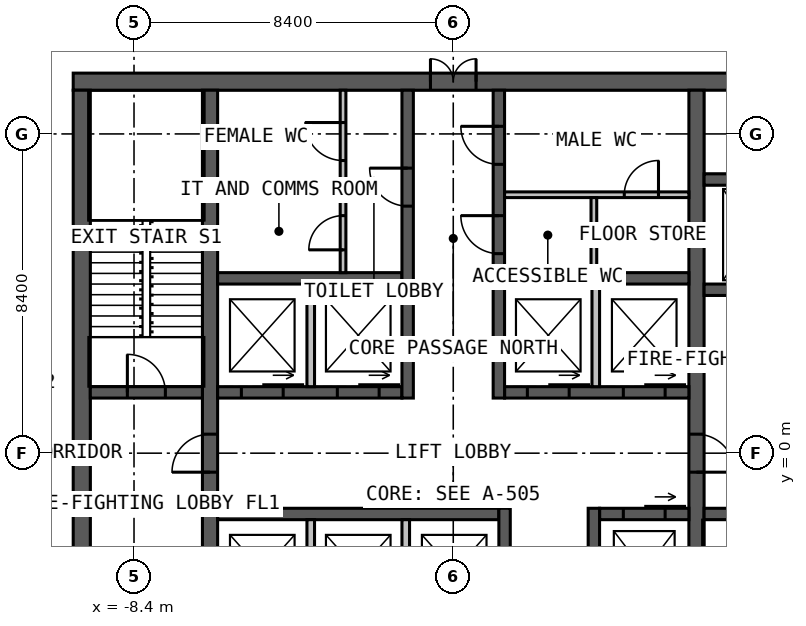
"""IFC4 building model, lengths in metres.
Left out: names, types, materials, properties, quantities, classifications, styles, units other than length and angle.
Written with IfcOpenShell. Run it as: python <this file> out.ifc"""

import sys

from ifc_helpers import new_model, si_unit, direction, frame, frame_2d, origin, place, context, subcontext, project, spatial, rectangle, extrude, element, fill, save


model = new_model("IFC4")
c1 = context("Model", 3, precision=1e-05, world=origin(), true_north=direction((0.0, 1.0)))
c2 = subcontext(c1, "Body", "Model", "MODEL_VIEW")
j1 = project(units=[si_unit("LENGTHUNIT", "METRE"), si_unit("PLANEANGLEUNIT", "RADIAN")], contexts=[c1])
p1 = place(None, origin())
s1 = spatial("IfcSite", under=j1, at=p1, CompositionType="ELEMENT")
p2 = place(p1, origin())
s2 = spatial("IfcBuilding", under=s1, at=p2, CompositionType="ELEMENT")
p3 = place(p2, frame((0.0, 0.0, 187.0)))
s3 = spatial("IfcBuildingStorey", under=s2, at=p3, CompositionType="ELEMENT", Elevation=187.0)
p4 = place(p3, frame((-10.0, 9.775, 0.0), z_axis=(0.0, 0.0, 1.0), x_axis=(1.0, 0.0, 0.0)))
e1 = element("IfcWall", 1, at=p4, inside=s3, PredefinedType="SOLIDWALL", context=c2, shape_type="SweptSolid", body=[
    extrude(rectangle(XDim=20.0, YDim=0.45, at=frame_2d((10.0, 0.0))), origin(), (0.0, 0.0, 1.0), 4.0),
])
p5 = place(p4, frame((9.4, 0.0, 0.0)))
e2 = element("IfcOpeningElement", 2, at=p5, cuts=e1, PredefinedType="OPENING", context=c2, shape_type="SweptSolid", body=[
    extrude(rectangle(XDim=1.2, YDim=2.2, at=frame_2d((0.6, 1.1))), frame((0.0, 0.235, 0.0), z_axis=(0.0, -1.0, 0.0), x_axis=(1.0, 0.0, 0.0)), (0.0, 0.0, 1.0), 0.47),
])
p6 = place(p3, frame((-9.775, 9.55, 0.0), z_axis=(0.0, 0.0, 1.0), x_axis=(0.0, -1.0, 0.0)))
e3 = element("IfcWall", 3, at=p6, inside=s3, PredefinedType="SOLIDWALL", context=c2, shape_type="SweptSolid", body=[
    extrude(rectangle(XDim=19.1, YDim=0.45, at=frame_2d((9.55, 0.0))), origin(), (0.0, 0.0, 1.0), 4.0),
])
p7 = place(p3, frame((-6.4, -9.55, 0.0), z_axis=(0.0, 0.0, 1.0), x_axis=(0.0, 1.0, 0.0)))
e4 = element("IfcWall", 4, at=p7, inside=s3, PredefinedType="SOLIDWALL", context=c2, shape_type="SweptSolid", body=[
    extrude(rectangle(XDim=19.1, YDim=0.4, at=frame_2d((9.55, 0.0))), origin(), (0.0, 0.0, 1.0), 4.0),
])
p8 = place(p7, frame((9.05, 0.0, 0.0)))
e5 = element("IfcOpeningElement", 5, at=p8, cuts=e4, PredefinedType="OPENING", context=c2, shape_type="SweptSolid", body=[
    extrude(rectangle(XDim=1.0, YDim=2.2, at=frame_2d((0.5, 1.1))), frame((0.0, 0.21, 0.0), z_axis=(0.0, -1.0, 0.0), x_axis=(1.0, 0.0, 0.0)), (0.0, 0.0, 1.0), 0.42),
])
p9 = place(p3, frame((6.4, 9.55, 0.0), z_axis=(0.0, 0.0, 1.0), x_axis=(0.0, -1.0, 0.0)))
e6 = element("IfcWall", 6, at=p9, inside=s3, PredefinedType="SOLIDWALL", context=c2, shape_type="SweptSolid", body=[
    extrude(rectangle(XDim=19.1, YDim=0.4, at=frame_2d((9.55, 0.0))), origin(), (0.0, 0.0, 1.0), 4.0),
])
p10 = place(p9, frame((9.05, 0.0, 0.0)))
e7 = element("IfcOpeningElement", 7, at=p10, cuts=e6, PredefinedType="OPENING", context=c2, shape_type="SweptSolid", body=[
    extrude(rectangle(XDim=1.0, YDim=2.2, at=frame_2d((0.5, 1.1))), frame((0.0, 0.21, 0.0), z_axis=(0.0, -1.0, 0.0), x_axis=(1.0, 0.0, 0.0)), (0.0, 0.0, 1.0), 0.42),
])
p11 = place(p3, frame((-6.2, 1.6, 0.0), z_axis=(0.0, 0.0, 1.0), x_axis=(1.0, 0.0, 0.0)))
e8 = element("IfcWall", 8, at=p11, inside=s3, PredefinedType="SOLIDWALL", context=c2, shape_type="SweptSolid", body=[
    extrude(rectangle(XDim=4.85, YDim=0.3, at=frame_2d((2.425, 0.0))), origin(), (0.0, 0.0, 1.0), 4.0),
])
p12 = place(p11, frame((0.625, 0.0, 0.0)))
e9 = element("IfcOpeningElement", 9, at=p12, cuts=e8, PredefinedType="OPENING", context=c2, shape_type="SweptSolid", body=[
    extrude(rectangle(XDim=1.1, YDim=2.2, at=frame_2d((0.55, 1.1))), frame((0.0, 0.16, 0.0), z_axis=(0.0, -1.0, 0.0), x_axis=(1.0, 0.0, 0.0)), (0.0, 0.0, 1.0), 0.32),
])
p13 = place(p11, frame((3.15, 0.0, 0.0)))
e10 = element("IfcOpeningElement", 10, at=p13, cuts=e8, PredefinedType="OPENING", context=c2, shape_type="SweptSolid", body=[
    extrude(rectangle(XDim=1.1, YDim=2.2, at=frame_2d((0.55, 1.1))), frame((0.0, 0.16, 0.0), z_axis=(0.0, -1.0, 0.0), x_axis=(1.0, 0.0, 0.0)), (0.0, 0.0, 1.0), 0.32),
])
p14 = place(p3, frame((1.35, 1.6, 0.0), z_axis=(0.0, 0.0, 1.0), x_axis=(1.0, 0.0, 0.0)))
e11 = element("IfcWall", 11, at=p14, inside=s3, PredefinedType="SOLIDWALL", context=c2, shape_type="SweptSolid", body=[
    extrude(rectangle(XDim=4.85, YDim=0.3, at=frame_2d((2.425, 0.0))), origin(), (0.0, 0.0, 1.0), 4.0),
])
p15 = place(p14, frame((0.6, 0.0, 0.0)))
e12 = element("IfcOpeningElement", 12, at=p15, cuts=e11, PredefinedType="OPENING", context=c2, shape_type="SweptSolid", body=[
    extrude(rectangle(XDim=1.1, YDim=2.2, at=frame_2d((0.55, 1.1))), frame((0.0, 0.16, 0.0), z_axis=(0.0, -1.0, 0.0), x_axis=(1.0, 0.0, 0.0)), (0.0, 0.0, 1.0), 0.32),
])
p16 = place(p14, frame((3.125, 0.0, 0.0)))
e13 = element("IfcOpeningElement", 13, at=p16, cuts=e11, PredefinedType="OPENING", context=c2, shape_type="SweptSolid", body=[
    extrude(rectangle(XDim=1.1, YDim=2.2, at=frame_2d((0.55, 1.1))), frame((0.0, 0.16, 0.0), z_axis=(0.0, -1.0, 0.0), x_axis=(1.0, 0.0, 0.0)), (0.0, 0.0, 1.0), 0.32),
])
for number, where, z_axis, x_axis in (
    (14, (-6.2, 4.6, 0.0), (0.0, 0.0, 1.0), (1.0, 0.0, 0.0)),
    (15, (1.35, 4.6, 0.0), (0.0, 0.0, 1.0), (1.0, 0.0, 0.0)),
):
    element("IfcWall", number, at=place(p3, frame(where, z_axis=z_axis, x_axis=x_axis)), inside=s3, PredefinedType="SOLIDWALL", context=c2, shape_type="SweptSolid", body=[
        extrude(rectangle(XDim=4.85, YDim=0.3, at=frame_2d((2.425, 0.0))), origin(), (0.0, 0.0, 1.0), 4.0),
    ])
p17 = place(p3, frame((-1.2, 1.45, 0.0), z_axis=(0.0, 0.0, 1.0), x_axis=(0.0, 1.0, 0.0)))
e16 = element("IfcWall", 16, at=p17, inside=s3, PredefinedType="SOLIDWALL", context=c2, shape_type="SweptSolid", body=[
    extrude(rectangle(XDim=8.1, YDim=0.3, at=frame_2d((4.05, 0.0))), origin(), (0.0, 0.0, 1.0), 4.0),
])
p18 = place(p17, frame((5.05, 0.0, 0.0)))
e17 = element("IfcOpeningElement", 17, at=p18, cuts=e16, PredefinedType="OPENING", context=c2, shape_type="SweptSolid", body=[
    extrude(rectangle(XDim=1.0, YDim=2.2, at=frame_2d((0.5, 1.1))), frame((0.0, 0.16, 0.0), z_axis=(0.0, -1.0, 0.0), x_axis=(1.0, 0.0, 0.0)), (0.0, 0.0, 1.0), 0.32),
])
p19 = place(p3, frame((1.2, 1.45, 0.0), z_axis=(0.0, 0.0, 1.0), x_axis=(0.0, 1.0, 0.0)))
e18 = element("IfcWall", 18, at=p19, inside=s3, PredefinedType="SOLIDWALL", context=c2, shape_type="SweptSolid", body=[
    extrude(rectangle(XDim=8.1, YDim=0.3, at=frame_2d((4.05, 0.0))), origin(), (0.0, 0.0, 1.0), 4.0),
])
p20 = place(p19, frame((3.8, 0.0, 0.0)))
e19 = element("IfcOpeningElement", 19, at=p20, cuts=e18, PredefinedType="OPENING", context=c2, shape_type="SweptSolid", body=[
    extrude(rectangle(XDim=1.0, YDim=2.2, at=frame_2d((0.5, 1.1))), frame((0.0, 0.16, 0.0), z_axis=(0.0, -1.0, 0.0), x_axis=(1.0, 0.0, 0.0)), (0.0, 0.0, 1.0), 0.32),
])
p21 = place(p19, frame((6.15, 0.0, 0.0)))
e20 = element("IfcOpeningElement", 20, at=p21, cuts=e18, PredefinedType="OPENING", context=c2, shape_type="SweptSolid", body=[
    extrude(rectangle(XDim=1.0, YDim=2.2, at=frame_2d((0.5, 1.1))), frame((0.0, 0.16, 0.0), z_axis=(0.0, -1.0, 0.0), x_axis=(1.0, 0.0, 0.0)), (0.0, 0.0, 1.0), 0.32),
])
p22 = place(p3, frame((-6.2, -1.6, 0.0), z_axis=(0.0, 0.0, 1.0), x_axis=(1.0, 0.0, 0.0)))
e21 = element("IfcWall", 21, at=p22, inside=s3, PredefinedType="SOLIDWALL", context=c2, shape_type="SweptSolid", body=[
    extrude(rectangle(XDim=7.4, YDim=0.3, at=frame_2d((3.7, 0.0))), origin(), (0.0, 0.0, 1.0), 4.0),
])
p23 = place(p3, frame((3.85, -1.6, 0.0), z_axis=(0.0, 0.0, 1.0), x_axis=(1.0, 0.0, 0.0)))
e22 = element("IfcWall", 22, at=p23, inside=s3, PredefinedType="SOLIDWALL", context=c2, shape_type="SweptSolid", body=[
    extrude(rectangle(XDim=2.35, YDim=0.3, at=frame_2d((1.175, 0.0))), origin(), (0.0, 0.0, 1.0), 4.0),
])
p24 = place(p23, frame((0.625, 0.0, 0.0)))
e23 = element("IfcOpeningElement", 23, at=p24, cuts=e22, PredefinedType="OPENING", context=c2, shape_type="SweptSolid", body=[
    extrude(rectangle(XDim=1.1, YDim=2.2, at=frame_2d((0.55, 1.1))), frame((0.0, 0.16, 0.0), z_axis=(0.0, -1.0, 0.0), x_axis=(1.0, 0.0, 0.0)), (0.0, 0.0, 1.0), 0.32),
])
p25 = place(p3, frame((1.35, -1.45, 0.0), z_axis=(0.0, 0.0, 1.0), x_axis=(0.0, -1.0, 0.0)))
e24 = element("IfcWall", 24, at=p25, inside=s3, PredefinedType="SOLIDWALL", context=c2, shape_type="SweptSolid", body=[
    extrude(rectangle(XDim=8.1, YDim=0.3, at=frame_2d((4.05, 0.0))), origin(), (0.0, 0.0, 1.0), 4.0),
])
p26 = place(p25, frame((5.975, 0.0, 0.0)))
e25 = element("IfcOpeningElement", 25, at=p26, cuts=e24, PredefinedType="OPENING", context=c2, shape_type="SweptSolid", body=[
    extrude(rectangle(XDim=1.0, YDim=2.2, at=frame_2d((0.5, 1.1))), frame((0.0, 0.16, 0.0), z_axis=(0.0, -1.0, 0.0), x_axis=(1.0, 0.0, 0.0)), (0.0, 0.0, 1.0), 0.32),
])
p27 = place(p25, frame((3.525, 0.0, 0.0)))
e26 = element("IfcOpeningElement", 26, at=p27, cuts=e24, PredefinedType="OPENING", context=c2, shape_type="SweptSolid", body=[
    extrude(rectangle(XDim=0.9, YDim=2.2, at=frame_2d((0.45, 1.1))), frame((0.0, 0.16, 0.0), z_axis=(0.0, -1.0, 0.0), x_axis=(1.0, 0.0, 0.0)), (0.0, 0.0, 1.0), 0.32),
])
p28 = place(p3, frame((3.7, -1.45, 0.0), z_axis=(0.0, 0.0, 1.0), x_axis=(0.0, -1.0, 0.0)))
e27 = element("IfcWall", 27, at=p28, inside=s3, PredefinedType="SOLIDWALL", context=c2, shape_type="SweptSolid", body=[
    extrude(rectangle(XDim=8.1, YDim=0.3, at=frame_2d((4.05, 0.0))), origin(), (0.0, 0.0, 1.0), 4.0),
])
p29 = place(p28, frame((5.1, 0.0, 0.0)))
e28 = element("IfcOpeningElement", 28, at=p29, cuts=e27, PredefinedType="OPENING", context=c2, shape_type="SweptSolid", body=[
    extrude(rectangle(XDim=0.9, YDim=2.2, at=frame_2d((0.45, 1.1))), frame((0.0, 0.16, 0.0), z_axis=(0.0, -1.0, 0.0), x_axis=(1.0, 0.0, 0.0)), (0.0, 0.0, 1.0), 0.32),
])
p30 = place(p3, frame((-9.55, 1.6, 0.0), z_axis=(0.0, 0.0, 1.0), x_axis=(1.0, 0.0, 0.0)))
e29 = element("IfcWall", 29, at=p30, inside=s3, PredefinedType="SOLIDWALL", context=c2, shape_type="SweptSolid", body=[
    extrude(rectangle(XDim=2.95, YDim=0.3, at=frame_2d((1.475, 0.0))), origin(), (0.0, 0.0, 1.0), 4.0),
])
p31 = place(p30, frame((0.975, 0.0, 0.0)))
e30 = element("IfcOpeningElement", 30, at=p31, cuts=e29, PredefinedType="OPENING", context=c2, shape_type="SweptSolid", body=[
    extrude(rectangle(XDim=1.0, YDim=2.2, at=frame_2d((0.5, 1.1))), frame((0.0, 0.16, 0.0), z_axis=(0.0, -1.0, 0.0), x_axis=(1.0, 0.0, 0.0)), (0.0, 0.0, 1.0), 0.32),
])
p32 = place(p3, frame((6.6, -1.6, 0.0), z_axis=(0.0, 0.0, 1.0), x_axis=(1.0, 0.0, 0.0)))
e31 = element("IfcWall", 31, at=p32, inside=s3, PredefinedType="SOLIDWALL", context=c2, shape_type="SweptSolid", body=[
    extrude(rectangle(XDim=2.95, YDim=0.3, at=frame_2d((1.475, 0.0))), origin(), (0.0, 0.0, 1.0), 4.0),
])
p33 = place(p32, frame((0.975, 0.0, 0.0)))
e32 = element("IfcOpeningElement", 32, at=p33, cuts=e31, PredefinedType="OPENING", context=c2, shape_type="SweptSolid", body=[
    extrude(rectangle(XDim=1.0, YDim=2.2, at=frame_2d((0.5, 1.1))), frame((0.0, 0.16, 0.0), z_axis=(0.0, -1.0, 0.0), x_axis=(1.0, 0.0, 0.0)), (0.0, 0.0, 1.0), 0.32),
])
p34 = place(p3, frame((6.6, 4.3, 0.0), z_axis=(0.0, 0.0, 1.0), x_axis=(1.0, 0.0, 0.0)))
e33 = element("IfcWall", 33, at=p34, inside=s3, PredefinedType="SOLIDWALL", context=c2, shape_type="SweptSolid", body=[
    extrude(rectangle(XDim=2.95, YDim=0.3, at=frame_2d((1.475, 0.0))), origin(), (0.0, 0.0, 1.0), 4.0),
])
p35 = place(p34, frame((0.75, 0.0, 0.0)))
e34 = element("IfcOpeningElement", 34, at=p35, cuts=e33, PredefinedType="OPENING", context=c2, shape_type="SweptSolid", body=[
    extrude(rectangle(XDim=1.1, YDim=2.2, at=frame_2d((0.55, 1.1))), frame((0.0, 0.16, 0.0), z_axis=(0.0, -1.0, 0.0), x_axis=(1.0, 0.0, 0.0)), (0.0, 0.0, 1.0), 0.32),
])
p36 = place(p3, frame((6.6, 7.2, 0.0), z_axis=(0.0, 0.0, 1.0), x_axis=(1.0, 0.0, 0.0)))
e35 = element("IfcWall", 35, at=p36, inside=s3, PredefinedType="SOLIDWALL", context=c2, shape_type="SweptSolid", body=[
    extrude(rectangle(XDim=2.95, YDim=0.3, at=frame_2d((1.475, 0.0))), origin(), (0.0, 0.0, 1.0), 4.0),
])
for number, where, z_axis, x_axis in (
    (36, (-3.75, 1.75, 0.0), (0.0, 0.0, 1.0), (0.0, 1.0, 0.0)),
    (37, (3.75, 1.75, 0.0), (0.0, 0.0, 1.0), (0.0, 1.0, 0.0)),
    (38, (-3.75, -1.75, 0.0), (0.0, 0.0, 1.0), (0.0, -1.0, 0.0)),
    (39, (-1.25, -1.75, 0.0), (0.0, 0.0, 1.0), (0.0, -1.0, 0.0)),
):
    element("IfcWall", number, at=place(p3, frame(where, z_axis=z_axis, x_axis=x_axis)), inside=s3, PredefinedType="SOLIDWALL", context=c2, shape_type="SweptSolid", body=[
        extrude(rectangle(XDim=2.7, YDim=0.2, at=frame_2d((1.35, 0.0))), origin(), (0.0, 0.0, 1.0), 3.75),
    ])
p37 = place(p3, frame((1.35, 6.8, 0.0), z_axis=(0.0, 0.0, 1.0), x_axis=(1.0, 0.0, 0.0)))
e40 = element("IfcWall", 40, at=p37, inside=s3, PredefinedType="PARTITIONING", context=c2, shape_type="SweptSolid", body=[
    extrude(rectangle(XDim=4.85, YDim=0.15, at=frame_2d((2.425, 0.0))), origin(), (0.0, 0.0, 1.0), 3.75),
])
p38 = place(p37, frame((3.15, 0.0, 0.0)))
e41 = element("IfcOpeningElement", 41, at=p38, cuts=e40, PredefinedType="OPENING", context=c2, shape_type="SweptSolid", body=[
    extrude(rectangle(XDim=0.9, YDim=2.2, at=frame_2d((0.45, 1.1))), frame((0.0, 0.085, 0.0), z_axis=(0.0, -1.0, 0.0), x_axis=(1.0, 0.0, 0.0)), (0.0, 0.0, 1.0), 0.17),
])
p39 = place(p3, frame((3.7, 4.75, 0.0), z_axis=(0.0, 0.0, 1.0), x_axis=(0.0, 1.0, 0.0)))
e42 = element("IfcWall", 42, at=p39, inside=s3, PredefinedType="PARTITIONING", context=c2, shape_type="SweptSolid", body=[
    extrude(rectangle(XDim=1.975, YDim=0.15, at=frame_2d((0.988, 0.0))), origin(), (0.0, 0.0, 1.0), 3.75),
])
p40 = place(p3, frame((-2.9, 4.75, 0.0), z_axis=(0.0, 0.0, 1.0), x_axis=(0.0, 1.0, 0.0)))
e43 = element("IfcWall", 43, at=p40, inside=s3, PredefinedType="PARTITIONING", context=c2, shape_type="SweptSolid", body=[
    extrude(rectangle(XDim=4.8, YDim=0.15, at=frame_2d((2.4, 0.0))), origin(), (0.0, 0.0, 1.0), 3.75),
])
p41 = place(p40, frame((2.95, 0.0, 0.0)))
e44 = element("IfcOpeningElement", 44, at=p41, cuts=e43, PredefinedType="OPENING", context=c2, shape_type="SweptSolid", body=[
    extrude(rectangle(XDim=1.0, YDim=2.2, at=frame_2d((0.5, 1.1))), frame((0.0, 0.085, 0.0), z_axis=(0.0, -1.0, 0.0), x_axis=(1.0, 0.0, 0.0)), (0.0, 0.0, 1.0), 0.17),
])
p42 = place(p40, frame((0.6, 0.0, 0.0)))
e45 = element("IfcOpeningElement", 45, at=p42, cuts=e43, PredefinedType="OPENING", context=c2, shape_type="SweptSolid", body=[
    extrude(rectangle(XDim=0.9, YDim=2.2, at=frame_2d((0.45, 1.1))), frame((0.0, 0.085, 0.0), z_axis=(0.0, -1.0, 0.0), x_axis=(1.0, 0.0, 0.0)), (0.0, 0.0, 1.0), 0.17),
])
p43 = place(p3, frame((-6.2, 7.0, 0.0), z_axis=(0.0, 0.0, 1.0), x_axis=(1.0, 0.0, 0.0)))
e46 = element("IfcWall", 46, at=p43, inside=s3, PredefinedType="PARTITIONING", context=c2, shape_type="SweptSolid", body=[
    extrude(rectangle(XDim=3.225, YDim=0.15, at=frame_2d((1.612, 0.0))), origin(), (0.0, 0.0, 1.0), 3.75),
])
p44 = place(p5, origin())
e47 = element("IfcDoor", 47, at=p44, inside=s3, OperationType="DOUBLE_DOOR_SINGLE_SWING", PredefinedType="DOOR", context=c2, shape_type="SweptSolid", body=[
    extrude(rectangle(XDim=1.2, YDim=2.2, at=frame_2d((0.6, 1.1))), frame((0.0, 0.025, 0.0), z_axis=(0.0, -1.0, 0.0), x_axis=(1.0, 0.0, 0.0)), (0.0, 0.0, 1.0), 0.05),
])
fill(e2, e47)
p45 = place(p8, origin())
e48 = element("IfcDoor", 48, at=p45, inside=s3, OperationType="SINGLE_SWING_LEFT", PredefinedType="DOOR", context=c2, shape_type="SweptSolid", body=[
    extrude(rectangle(XDim=1.0, YDim=2.2, at=frame_2d((0.5, 1.1))), frame((0.0, 0.025, 0.0), z_axis=(0.0, -1.0, 0.0), x_axis=(1.0, 0.0, 0.0)), (0.0, 0.0, 1.0), 0.05),
])
fill(e5, e48)
p46 = place(p10, origin())
e49 = element("IfcDoor", 49, at=p46, inside=s3, OperationType="SINGLE_SWING_RIGHT", PredefinedType="DOOR", context=c2, shape_type="SweptSolid", body=[
    extrude(rectangle(XDim=1.0, YDim=2.2, at=frame_2d((0.5, 1.1))), frame((0.0, 0.025, 0.0), z_axis=(0.0, -1.0, 0.0), x_axis=(1.0, 0.0, 0.0)), (0.0, 0.0, 1.0), 0.05),
])
fill(e7, e49)
p47 = place(p31, origin())
e50 = element("IfcDoor", 50, at=p47, inside=s3, OperationType="SINGLE_SWING_LEFT", PredefinedType="DOOR", context=c2, shape_type="SweptSolid", body=[
    extrude(rectangle(XDim=1.0, YDim=2.2, at=frame_2d((0.5, 1.1))), frame((0.0, 0.025, 0.0), z_axis=(0.0, -1.0, 0.0), x_axis=(1.0, 0.0, 0.0)), (0.0, 0.0, 1.0), 0.05),
])
fill(e30, e50)
p48 = place(p18, origin())
e51 = element("IfcDoor", 51, at=p48, inside=s3, OperationType="SINGLE_SWING_RIGHT", PredefinedType="DOOR", context=c2, shape_type="SweptSolid", body=[
    extrude(rectangle(XDim=1.0, YDim=2.2, at=frame_2d((0.5, 1.1))), frame((0.0, 0.025, 0.0), z_axis=(0.0, -1.0, 0.0), x_axis=(1.0, 0.0, 0.0)), (0.0, 0.0, 1.0), 0.05),
])
fill(e17, e51)
p49 = place(p20, origin())
e52 = element("IfcDoor", 52, at=p49, inside=s3, OperationType="SINGLE_SWING_RIGHT", PredefinedType="DOOR", context=c2, shape_type="SweptSolid", body=[
    extrude(rectangle(XDim=1.0, YDim=2.2, at=frame_2d((0.5, 1.1))), frame((0.0, 0.025, 0.0), z_axis=(0.0, -1.0, 0.0), x_axis=(1.0, 0.0, 0.0)), (0.0, 0.0, 1.0), 0.05),
])
fill(e19, e52)
p50 = place(p21, origin())
e53 = element("IfcDoor", 53, at=p50, inside=s3, OperationType="SINGLE_SWING_RIGHT", PredefinedType="DOOR", context=c2, shape_type="SweptSolid", body=[
    extrude(rectangle(XDim=1.0, YDim=2.2, at=frame_2d((0.5, 1.1))), frame((0.0, 0.025, 0.0), z_axis=(0.0, -1.0, 0.0), x_axis=(1.0, 0.0, 0.0)), (0.0, 0.0, 1.0), 0.05),
])
fill(e20, e53)
p51 = place(p38, origin())
e54 = element("IfcDoor", 54, at=p51, inside=s3, OperationType="SINGLE_SWING_RIGHT", PredefinedType="DOOR", context=c2, shape_type="SweptSolid", body=[
    extrude(rectangle(XDim=0.9, YDim=2.2, at=frame_2d((0.45, 1.1))), frame((0.0, 0.025, 0.0), z_axis=(0.0, -1.0, 0.0), x_axis=(1.0, 0.0, 0.0)), (0.0, 0.0, 1.0), 0.05),
])
fill(e41, e54)
p52 = place(p41, origin())
e55 = element("IfcDoor", 55, at=p52, inside=s3, OperationType="SINGLE_SWING_RIGHT", PredefinedType="DOOR", context=c2, shape_type="SweptSolid", body=[
    extrude(rectangle(XDim=1.0, YDim=2.2, at=frame_2d((0.5, 1.1))), frame((0.0, 0.025, 0.0), z_axis=(0.0, -1.0, 0.0), x_axis=(1.0, 0.0, 0.0)), (0.0, 0.0, 1.0), 0.05),
])
fill(e44, e55)
p53 = place(p42, origin())
e56 = element("IfcDoor", 56, at=p53, inside=s3, OperationType="SINGLE_SWING_LEFT", PredefinedType="DOOR", context=c2, shape_type="SweptSolid", body=[
    extrude(rectangle(XDim=0.9, YDim=2.2, at=frame_2d((0.45, 1.1))), frame((0.0, 0.025, 0.0), z_axis=(0.0, -1.0, 0.0), x_axis=(1.0, 0.0, 0.0)), (0.0, 0.0, 1.0), 0.05),
])
fill(e45, e56)
p54 = place(p12, origin())
e57 = element("IfcDoor", 57, at=p54, inside=s3, OperationType="SLIDING_TO_LEFT", PredefinedType="DOOR", context=c2, shape_type="SweptSolid", body=[
    extrude(rectangle(XDim=1.1, YDim=2.2, at=frame_2d((0.55, 1.1))), frame((0.0, 0.025, 0.0), z_axis=(0.0, -1.0, 0.0), x_axis=(1.0, 0.0, 0.0)), (0.0, 0.0, 1.0), 0.05),
])
fill(e9, e57)
p55 = place(p13, origin())
e58 = element("IfcDoor", 58, at=p55, inside=s3, OperationType="SLIDING_TO_LEFT", PredefinedType="DOOR", context=c2, shape_type="SweptSolid", body=[
    extrude(rectangle(XDim=1.1, YDim=2.2, at=frame_2d((0.55, 1.1))), frame((0.0, 0.025, 0.0), z_axis=(0.0, -1.0, 0.0), x_axis=(1.0, 0.0, 0.0)), (0.0, 0.0, 1.0), 0.05),
])
fill(e10, e58)
p56 = place(p15, origin())
e59 = element("IfcDoor", 59, at=p56, inside=s3, OperationType="SLIDING_TO_LEFT", PredefinedType="DOOR", context=c2, shape_type="SweptSolid", body=[
    extrude(rectangle(XDim=1.1, YDim=2.2, at=frame_2d((0.55, 1.1))), frame((0.0, 0.025, 0.0), z_axis=(0.0, -1.0, 0.0), x_axis=(1.0, 0.0, 0.0)), (0.0, 0.0, 1.0), 0.05),
])
fill(e12, e59)
p57 = place(p16, origin())
e60 = element("IfcDoor", 60, at=p57, inside=s3, OperationType="SLIDING_TO_LEFT", PredefinedType="DOOR", context=c2, shape_type="SweptSolid", body=[
    extrude(rectangle(XDim=1.1, YDim=2.2, at=frame_2d((0.55, 1.1))), frame((0.0, 0.025, 0.0), z_axis=(0.0, -1.0, 0.0), x_axis=(1.0, 0.0, 0.0)), (0.0, 0.0, 1.0), 0.05),
])
fill(e13, e60)
p58 = place(p24, origin())
e61 = element("IfcDoor", 61, at=p58, inside=s3, OperationType="SLIDING_TO_LEFT", PredefinedType="DOOR", context=c2, shape_type="SweptSolid", body=[
    extrude(rectangle(XDim=1.1, YDim=2.2, at=frame_2d((0.55, 1.1))), frame((0.0, 0.025, 0.0), z_axis=(0.0, -1.0, 0.0), x_axis=(1.0, 0.0, 0.0)), (0.0, 0.0, 1.0), 0.05),
])
fill(e23, e61)
save(model, sys.argv[1])
